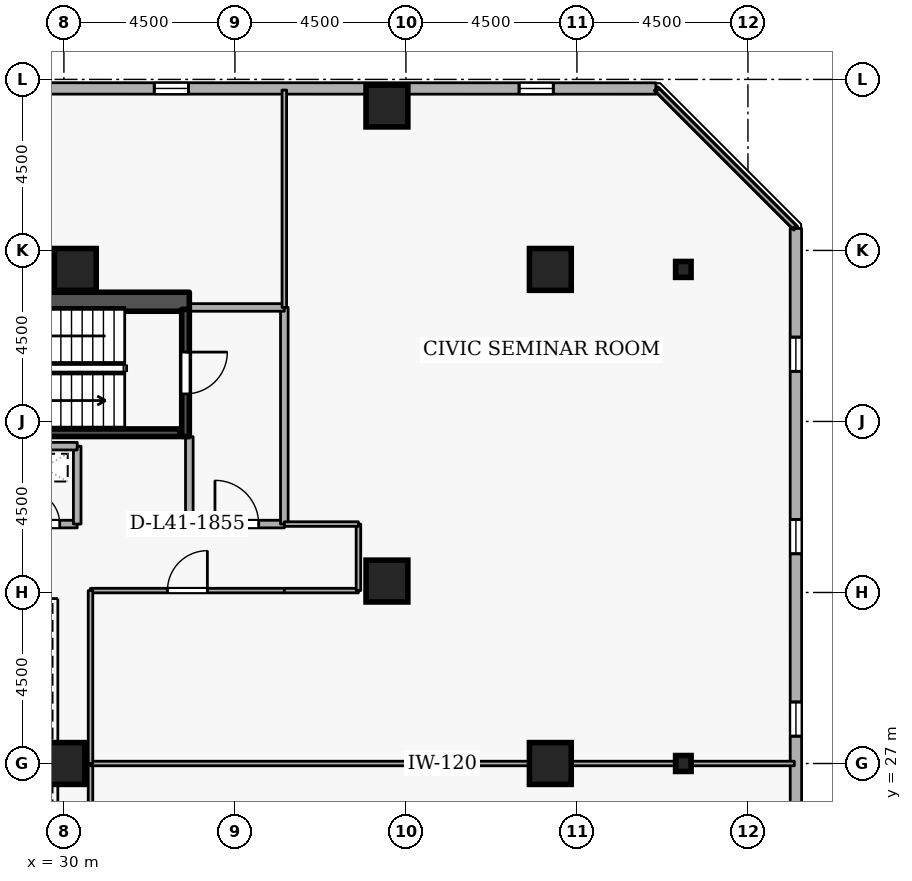
"""IFC4 building model, lengths in metres.
Left out: names, types, materials, properties, quantities, classifications, styles, units other than length and angle.
Written with IfcOpenShell. Run it as: python <this file> out.ifc"""

import sys

from ifc_helpers import new_model, si_unit, direction, frame, frame_2d, origin, origin_2d, place, context, subcontext, project, spatial, rectangle, i_section, extrude, element, fill, save


model = new_model("IFC4")
c1 = context("Model", 3, precision=1e-05, world=origin(), true_north=direction((0.0, 1.0)))
c2 = subcontext(c1, "Body", "Model", "MODEL_VIEW")
j1 = project(units=[si_unit("LENGTHUNIT", "METRE"), si_unit("PLANEANGLEUNIT", "RADIAN")], contexts=[c1])
p1 = place(None, origin())
s1 = spatial("IfcSite", under=j1, at=p1, CompositionType="ELEMENT")
p2 = place(p1, origin())
s2 = spatial("IfcBuilding", under=s1, at=p2, CompositionType="ELEMENT")
p3 = place(p2, frame((0.0, 0.0, 156.3)))
s3 = spatial("IfcBuildingStorey", under=s2, at=p3, CompositionType="ELEMENT", Elevation=156.3)
p4 = place(p3, frame((17.7, 39.15, 0.0), z_axis=(0.0, 0.0, 1.0), x_axis=(1.0, 0.0, 0.0)))
e1 = element("IfcWall", 1, at=p4, inside=s3, PredefinedType="SHEAR", context=c2, shape_type="SweptSolid", body=[
    extrude(rectangle(XDim=15.6, YDim=0.5, at=frame_2d((7.8, 0.0))), origin(), (0.0, 0.0, 1.0), 3.6),
])
for number, where, z_axis, x_axis in (
    (2, (42.8, 27.0, 0.0), (0.0, 0.0, 1.0), (1.0, 0.0, 0.0)),
    (3, (42.8, 40.0, 0.0), (0.0, 0.0, 1.0), (1.0, 0.0, 0.0)),
    (4, (38.5, 44.3, 0.0), (0.0, 0.0, 1.0), (1.0, 0.0, 0.0)),
    (5, (38.5, 31.8, 0.0), (0.0, 0.0, 1.0), (1.0, 0.0, 0.0)),
    (6, (30.3, 40.0, 0.0), (0.0, 0.0, 1.0), (1.0, 0.0, 0.0)),
    (7, (30.0, 27.0, 0.0), (0.0, 0.0, 1.0), (1.0, 0.0, 0.0)),
):
    element("IfcColumn", number, at=place(p3, frame(where, z_axis=z_axis, x_axis=x_axis)), inside=s3, PredefinedType="COLUMN", context=c2, shape_type="SweptSolid", body=[
        extrude(rectangle(XDim=1.1, YDim=1.1, at=origin_2d()), origin(), (0.0, 0.0, 1.0), 3.6),
    ])
for number, where, z_axis, x_axis in (
    (8, (46.3, 27.0, 0.0), (0.0, 0.0, 1.0), (1.0, 0.0, 0.0)),
    (9, (46.3, 40.0, 0.0), (0.0, 0.0, 1.0), (1.0, 0.0, 0.0)),
):
    element("IfcColumn", number, at=place(p3, frame(where, z_axis=z_axis, x_axis=x_axis)), inside=s3, PredefinedType="COLUMN", context=c2, shape_type="SweptSolid", body=[
        extrude(i_section(OverallWidth=0.407, OverallDepth=0.419, WebThickness=0.031, FlangeThickness=0.049, FilletRadius=0.015, at=origin_2d()), origin(), (0.0, 0.0, 1.0), 3.6),
    ])
p5 = place(p3, frame((49.265, 5.819, 0.0), z_axis=(0.0, 0.0, 1.0), x_axis=(-0.000103863011, 0.999999994606, 0.0)))
e10 = element("IfcWall", 10, at=p5, inside=s3, PredefinedType="STANDARD", context=c2, shape_type="SweptSolid", body=[
    extrude(rectangle(XDim=35.259, YDim=0.3, at=frame_2d((17.629, 0.0))), origin(), (0.0, 0.0, 1.0), 2.7),
])
p6 = place(p5, frame((2.7, 0.0, 0.72)))
e11 = element("IfcOpeningElement", 11, at=p6, cuts=e10, PredefinedType="OPENING", context=c2, shape_type="SweptSolid", body=[
    extrude(rectangle(XDim=0.9, YDim=1.75, at=frame_2d((0.45, 0.875))), frame((0.0, 0.16, 0.0), z_axis=(0.0, -1.0, 0.0), x_axis=(1.0, 0.0, 0.0)), (0.0, 0.0, 1.0), 0.32),
])
p7 = place(p5, frame((7.5, 0.0, 0.72)))
e12 = element("IfcOpeningElement", 12, at=p7, cuts=e10, PredefinedType="OPENING", context=c2, shape_type="SweptSolid", body=[
    extrude(rectangle(XDim=0.9, YDim=1.75, at=frame_2d((0.45, 0.875))), frame((0.0, 0.16, 0.0), z_axis=(0.0, -1.0, 0.0), x_axis=(1.0, 0.0, 0.0)), (0.0, 0.0, 1.0), 0.32),
])
p8 = place(p5, frame((12.3, 0.0, 0.72)))
e13 = element("IfcOpeningElement", 13, at=p8, cuts=e10, PredefinedType="OPENING", context=c2, shape_type="SweptSolid", body=[
    extrude(rectangle(XDim=0.9, YDim=1.75, at=frame_2d((0.45, 0.875))), frame((0.0, 0.16, 0.0), z_axis=(0.0, -1.0, 0.0), x_axis=(1.0, 0.0, 0.0)), (0.0, 0.0, 1.0), 0.32),
])
p9 = place(p5, frame((17.1, 0.0, 0.72)))
e14 = element("IfcOpeningElement", 14, at=p9, cuts=e10, PredefinedType="OPENING", context=c2, shape_type="SweptSolid", body=[
    extrude(rectangle(XDim=0.9, YDim=1.75, at=frame_2d((0.45, 0.875))), frame((0.0, 0.16, 0.0), z_axis=(0.0, -1.0, 0.0), x_axis=(1.0, 0.0, 0.0)), (0.0, 0.0, 1.0), 0.32),
])
p10 = place(p5, frame((21.9, 0.0, 0.72)))
e15 = element("IfcOpeningElement", 15, at=p10, cuts=e10, PredefinedType="OPENING", context=c2, shape_type="SweptSolid", body=[
    extrude(rectangle(XDim=0.9, YDim=1.75, at=frame_2d((0.45, 0.875))), frame((0.0, 0.16, 0.0), z_axis=(0.0, -1.0, 0.0), x_axis=(1.0, 0.0, 0.0)), (0.0, 0.0, 1.0), 0.32),
])
p11 = place(p5, frame((26.7, 0.0, 0.72)))
e16 = element("IfcOpeningElement", 16, at=p11, cuts=e10, PredefinedType="OPENING", context=c2, shape_type="SweptSolid", body=[
    extrude(rectangle(XDim=0.9, YDim=1.75, at=frame_2d((0.45, 0.875))), frame((0.0, 0.16, 0.0), z_axis=(0.0, -1.0, 0.0), x_axis=(1.0, 0.0, 0.0)), (0.0, 0.0, 1.0), 0.32),
])
p12 = place(p5, frame((31.5, 0.0, 0.72)))
e17 = element("IfcOpeningElement", 17, at=p12, cuts=e10, PredefinedType="OPENING", context=c2, shape_type="SweptSolid", body=[
    extrude(rectangle(XDim=0.9, YDim=1.75, at=frame_2d((0.45, 0.875))), frame((0.0, 0.16, 0.0), z_axis=(0.0, -1.0, 0.0), x_axis=(1.0, 0.0, 0.0)), (0.0, 0.0, 1.0), 0.32),
])
p13 = place(p3, frame((45.578, 44.761, 0.0), z_axis=(0.0, 0.0, 1.0), x_axis=(-0.999999994606, 0.000103863011, 0.0)))
e18 = element("IfcWall", 18, at=p13, inside=s3, PredefinedType="STANDARD", context=c2, shape_type="SweptSolid", body=[
    extrude(rectangle(XDim=35.259, YDim=0.3, at=frame_2d((17.629, 0.0))), origin(), (0.0, 0.0, 1.0), 2.7),
])
p14 = place(p13, frame((2.7, 0.0, 0.72)))
e19 = element("IfcOpeningElement", 19, at=p14, cuts=e18, PredefinedType="OPENING", context=c2, shape_type="SweptSolid", body=[
    extrude(rectangle(XDim=0.9, YDim=1.75, at=frame_2d((0.45, 0.875))), frame((0.0, 0.16, 0.0), z_axis=(0.0, -1.0, 0.0), x_axis=(1.0, 0.0, 0.0)), (0.0, 0.0, 1.0), 0.32),
])
p15 = place(p13, frame((12.3, 0.0, 0.72)))
e20 = element("IfcOpeningElement", 20, at=p15, cuts=e18, PredefinedType="OPENING", context=c2, shape_type="SweptSolid", body=[
    extrude(rectangle(XDim=0.9, YDim=1.75, at=frame_2d((0.45, 0.875))), frame((0.0, 0.16, 0.0), z_axis=(0.0, -1.0, 0.0), x_axis=(1.0, 0.0, 0.0)), (0.0, 0.0, 1.0), 0.32),
])
p16 = place(p13, frame((17.1, 0.0, 0.72)))
e21 = element("IfcOpeningElement", 21, at=p16, cuts=e18, PredefinedType="OPENING", context=c2, shape_type="SweptSolid", body=[
    extrude(rectangle(XDim=0.9, YDim=1.75, at=frame_2d((0.45, 0.875))), frame((0.0, 0.16, 0.0), z_axis=(0.0, -1.0, 0.0), x_axis=(1.0, 0.0, 0.0)), (0.0, 0.0, 1.0), 0.32),
])
p17 = place(p13, frame((21.9, 0.0, 0.72)))
e22 = element("IfcOpeningElement", 22, at=p17, cuts=e18, PredefinedType="OPENING", context=c2, shape_type="SweptSolid", body=[
    extrude(rectangle(XDim=0.9, YDim=1.75, at=frame_2d((0.45, 0.875))), frame((0.0, 0.16, 0.0), z_axis=(0.0, -1.0, 0.0), x_axis=(1.0, 0.0, 0.0)), (0.0, 0.0, 1.0), 0.32),
])
p18 = place(p13, frame((26.7, 0.0, 0.72)))
e23 = element("IfcOpeningElement", 23, at=p18, cuts=e18, PredefinedType="OPENING", context=c2, shape_type="SweptSolid", body=[
    extrude(rectangle(XDim=0.9, YDim=1.75, at=frame_2d((0.45, 0.875))), frame((0.0, 0.16, 0.0), z_axis=(0.0, -1.0, 0.0), x_axis=(1.0, 0.0, 0.0)), (0.0, 0.0, 1.0), 0.32),
])
p19 = place(p3, frame((33.2, 38.95, 0.0), z_axis=(0.0, 0.0, 1.0), x_axis=(0.0, -1.0, 0.0)))
e24 = element("IfcWall", 24, at=p19, inside=s3, PredefinedType="SHEAR", context=c2, shape_type="SweptSolid", body=[
    extrude(rectangle(XDim=3.35, YDim=0.2, at=frame_2d((1.675, 0.0))), origin(), (0.0, 0.0, 1.0), 3.6),
])
p20 = place(p19, frame((1.125, 0.0, 0.0)))
e25 = element("IfcOpeningElement", 25, at=p20, cuts=e24, PredefinedType="OPENING", context=c2, shape_type="SweptSolid", body=[
    extrude(rectangle(XDim=1.1, YDim=2.1, at=frame_2d((0.55, 1.05))), frame((0.0, 0.11, 0.0), z_axis=(0.0, -1.0, 0.0), x_axis=(1.0, 0.0, 0.0)), (0.0, 0.0, 1.0), 0.22),
])
p21 = place(p3, frame((25.95, 35.703, 0.0), z_axis=(0.0, 0.0, 1.0), x_axis=(1.0, 0.0, 0.0)))
e26 = element("IfcWall", 26, at=p21, inside=s3, PredefinedType="SHEAR", context=c2, shape_type="SweptSolid", body=[
    extrude(rectangle(XDim=7.1, YDim=0.2, at=frame_2d((3.55, 0.0))), origin(), (0.0, 0.0, 1.0), 3.6),
])
p22 = place(p3, frame((33.3, 33.3, 0.0), z_axis=(0.0, 0.0, 1.0), x_axis=(1.0, 0.0, 0.0)))
e27 = element("IfcWall", 27, at=p22, inside=s3, PredefinedType="STANDARD", context=c2, shape_type="SweptSolid", body=[
    extrude(rectangle(XDim=2.5, YDim=0.2, at=frame_2d((1.25, 0.0))), origin(), (0.0, 0.0, 1.0), 3.34),
])
p23 = place(p22, frame((0.675, 0.0, 0.0)))
e28 = element("IfcOpeningElement", 28, at=p23, cuts=e27, PredefinedType="OPENING", context=c2, shape_type="SweptSolid", body=[
    extrude(rectangle(XDim=1.15, YDim=2.1, at=frame_2d((0.575, 1.05))), frame((0.0, 0.11, 0.0), z_axis=(0.0, -1.0, 0.0), x_axis=(1.0, 0.0, 0.0)), (0.0, 0.0, 1.0), 0.22),
])
p24 = place(p3, frame((35.8, 33.3, 0.0), z_axis=(0.0, 0.0, 1.0), x_axis=(0.0, 1.0, 0.0)))
e29 = element("IfcWall", 29, at=p24, inside=s3, PredefinedType="STANDARD", context=c2, shape_type="SweptSolid", body=[
    extrude(rectangle(XDim=5.7, YDim=0.2, at=frame_2d((2.85, 0.0))), origin(), (0.0, 0.0, 1.0), 3.34),
])
p25 = place(p3, frame((35.8, 39.0, 0.0), z_axis=(0.0, 0.0, 1.0), x_axis=(-1.0, 0.0, 0.0)))
e30 = element("IfcWall", 30, at=p25, inside=s3, PredefinedType="STANDARD", context=c2, shape_type="SweptSolid", body=[
    extrude(rectangle(XDim=2.5, YDim=0.2, at=frame_2d((1.25, 0.0))), origin(), (0.0, 0.0, 1.0), 3.34),
])
p26 = place(p3, frame((33.3, 35.6, 0.0), z_axis=(0.0, 0.0, 1.0), x_axis=(0.0, -1.0, 0.0)))
e31 = element("IfcWall", 31, at=p26, inside=s3, PredefinedType="STANDARD", context=c2, shape_type="SweptSolid", body=[
    extrude(rectangle(XDim=2.3, YDim=0.2, at=frame_2d((1.15, 0.0))), origin(), (0.0, 0.0, 1.0), 2.545),
])
p27 = place(p3, frame((28.55, 33.3, 0.0), z_axis=(0.0, 0.0, 1.0), x_axis=(1.0, 0.0, 0.0)))
e32 = element("IfcWall", 32, at=p27, inside=s3, PredefinedType="STANDARD", context=c2, shape_type="SweptSolid", body=[
    extrude(rectangle(XDim=1.8, YDim=0.2, at=frame_2d((0.9, 0.0))), origin(), (0.0, 0.0, 1.0), 3.34),
])
p28 = place(p27, frame((0.46, 0.0, 0.0)))
e33 = element("IfcOpeningElement", 33, at=p28, cuts=e32, PredefinedType="OPENING", context=c2, shape_type="SweptSolid", body=[
    extrude(rectangle(XDim=0.88, YDim=2.04, at=frame_2d((0.44, 1.02))), frame((0.0, 0.11, 0.0), z_axis=(0.0, -1.0, 0.0), x_axis=(1.0, 0.0, 0.0)), (0.0, 0.0, 1.0), 0.22),
])
p29 = place(p3, frame((30.35, 33.3, 0.0), z_axis=(0.0, 0.0, 1.0), x_axis=(0.0, 1.0, 0.0)))
e34 = element("IfcWall", 34, at=p29, inside=s3, PredefinedType="STANDARD", context=c2, shape_type="SweptSolid", body=[
    extrude(rectangle(XDim=2.05, YDim=0.2, at=frame_2d((1.025, 0.0))), origin(), (0.0, 0.0, 1.0), 3.34),
])
p30 = place(p3, frame((30.35, 35.35, 0.0), z_axis=(0.0, 0.0, 1.0), x_axis=(-1.0, 0.0, 0.0)))
e35 = element("IfcWall", 35, at=p30, inside=s3, PredefinedType="STANDARD", context=c2, shape_type="SweptSolid", body=[
    extrude(rectangle(XDim=1.8, YDim=0.2, at=frame_2d((0.9, 0.0))), origin(), (0.0, 0.0, 1.0), 3.34),
])
p31 = place(p3, frame((30.7, 22.45, 0.0), z_axis=(0.0, 0.0, 1.0), x_axis=(0.0, 1.0, 0.0)))
e36 = element("IfcWall", 36, at=p31, inside=s3, PredefinedType="PARTITIONING", context=c2, shape_type="SweptSolid", body=[
    extrude(rectangle(XDim=4.55, YDim=0.12, at=frame_2d((2.275, 0.0))), origin(), (0.0, 0.0, 1.0), 3.34),
])
p32 = place(p3, frame((30.7, 27.0, 0.0), z_axis=(0.0, 0.0, 1.0), x_axis=(1.0, 0.0, 0.0)))
e37 = element("IfcWall", 37, at=p32, inside=s3, PredefinedType="PARTITIONING", context=c2, shape_type="SweptSolid", body=[
    extrude(rectangle(XDim=18.52, YDim=0.12, at=frame_2d((9.26, 0.0))), origin(), (0.0, 0.0, 1.0), 2.932),
])
p33 = place(p3, frame((30.7, 31.55, 0.0), z_axis=(0.0, 0.0, 1.0), x_axis=(1.0, 0.0, 0.0)))
e38 = element("IfcWall", 38, at=p33, inside=s3, PredefinedType="PARTITIONING", context=c2, shape_type="SweptSolid", body=[
    extrude(rectangle(XDim=5.1, YDim=0.12, at=frame_2d((2.55, 0.0))), origin(), (0.0, 0.0, 1.0), 3.34),
])
p34 = place(p33, frame((2.025, 0.0, 0.0)))
e39 = element("IfcOpeningElement", 39, at=p34, cuts=e38, PredefinedType="OPENING", context=c2, shape_type="SweptSolid", body=[
    extrude(rectangle(XDim=1.05, YDim=2.1, at=frame_2d((0.525, 1.05))), frame((0.0, 0.07, 0.0), z_axis=(0.0, -1.0, 0.0), x_axis=(1.0, 0.0, 0.0)), (0.0, 0.0, 1.0), 0.14),
])
p35 = place(p3, frame((35.8, 31.55, 0.0), z_axis=(0.0, 0.0, 1.0), x_axis=(1.0, 0.0, 0.0)))
e40 = element("IfcWall", 40, at=p35, inside=s3, PredefinedType="PARTITIONING", context=c2, shape_type="SweptSolid", body=[
    extrude(rectangle(XDim=1.95, YDim=0.12, at=frame_2d((0.975, 0.0))), origin(), (0.0, 0.0, 1.0), 3.34),
])
p36 = place(p3, frame((37.75, 31.55, 0.0), z_axis=(0.0, 0.0, 1.0), x_axis=(0.0, 1.0, 0.0)))
e41 = element("IfcWall", 41, at=p36, inside=s3, PredefinedType="PARTITIONING", context=c2, shape_type="SweptSolid", body=[
    extrude(rectangle(XDim=1.75, YDim=0.12, at=frame_2d((0.875, 0.0))), origin(), (0.0, 0.0, 1.0), 3.34),
])
p37 = place(p3, frame((37.75, 33.3, 0.0), z_axis=(0.0, 0.0, 1.0), x_axis=(-1.0, 0.0, 0.0)))
e42 = element("IfcWall", 42, at=p37, inside=s3, PredefinedType="PARTITIONING", context=c2, shape_type="SweptSolid", body=[
    extrude(rectangle(XDim=1.95, YDim=0.12, at=frame_2d((0.975, 0.0))), origin(), (0.0, 0.0, 1.0), 3.34),
])
p38 = place(p3, frame((35.8, 39.0, 0.0), z_axis=(0.0, 0.0, 1.0), x_axis=(0.0, 1.0, 0.0)))
e43 = element("IfcWall", 43, at=p38, inside=s3, PredefinedType="PARTITIONING", context=c2, shape_type="SweptSolid", body=[
    extrude(rectangle(XDim=5.72, YDim=0.12, at=frame_2d((2.86, 0.0))), origin(), (0.0, 0.0, 1.0), 3.34),
])
p39 = place(p3, frame((45.617, 44.72, 0.0), z_axis=(0.0, 0.0, 1.0), x_axis=(0.707106781187, -0.707106781187, 0.0)))
e44 = element("IfcWall", 44, at=p39, inside=s3, PredefinedType="PARTITIONING", context=c2, shape_type="SweptSolid", body=[
    extrude(rectangle(XDim=5.095, YDim=0.12, at=frame_2d((2.547, 0.0))), origin(), (0.0, 0.0, 1.0), 3.34),
])
p40 = place(p3, frame((30.7, 27.0, 0.0), z_axis=(0.0, 0.0, 1.0), x_axis=(0.0, 1.0, 0.0)))
e45 = element("IfcWall", 45, at=p40, inside=s3, PredefinedType="PARTITIONING", context=c2, shape_type="SweptSolid", body=[
    extrude(rectangle(XDim=4.55, YDim=0.12, at=frame_2d((2.275, 0.0))), origin(), (0.0, 0.0, 1.0), 3.34),
])
p41 = place(p10, origin())
e46 = element("IfcWindow", 46, at=p41, inside=s3, PartitioningType="SINGLE_PANEL", PredefinedType="WINDOW", context=c2, shape_type="SweptSolid", body=[
    extrude(rectangle(XDim=0.9, YDim=1.75, at=frame_2d((0.45, 0.875))), frame((0.0, 0.03, 0.0), z_axis=(0.0, -1.0, 0.0), x_axis=(1.0, 0.0, 0.0)), (0.0, 0.0, 1.0), 0.06),
])
fill(e15, e46)
p42 = place(p11, origin())
e47 = element("IfcWindow", 47, at=p42, inside=s3, PartitioningType="SINGLE_PANEL", PredefinedType="WINDOW", context=c2, shape_type="SweptSolid", body=[
    extrude(rectangle(XDim=0.9, YDim=1.75, at=frame_2d((0.45, 0.875))), frame((0.0, 0.03, 0.0), z_axis=(0.0, -1.0, 0.0), x_axis=(1.0, 0.0, 0.0)), (0.0, 0.0, 1.0), 0.06),
])
fill(e16, e47)
p43 = place(p12, origin())
e48 = element("IfcWindow", 48, at=p43, inside=s3, PartitioningType="SINGLE_PANEL", PredefinedType="WINDOW", context=c2, shape_type="SweptSolid", body=[
    extrude(rectangle(XDim=0.9, YDim=1.75, at=frame_2d((0.45, 0.875))), frame((0.0, 0.03, 0.0), z_axis=(0.0, -1.0, 0.0), x_axis=(1.0, 0.0, 0.0)), (0.0, 0.0, 1.0), 0.06),
])
fill(e17, e48)
p44 = place(p14, origin())
e49 = element("IfcWindow", 49, at=p44, inside=s3, PartitioningType="SINGLE_PANEL", PredefinedType="WINDOW", context=c2, shape_type="SweptSolid", body=[
    extrude(rectangle(XDim=0.9, YDim=1.75, at=frame_2d((0.45, 0.875))), frame((0.0, 0.03, 0.0), z_axis=(0.0, -1.0, 0.0), x_axis=(1.0, 0.0, 0.0)), (0.0, 0.0, 1.0), 0.06),
])
fill(e19, e49)
p45 = place(p15, origin())
e50 = element("IfcWindow", 50, at=p45, inside=s3, PartitioningType="SINGLE_PANEL", PredefinedType="WINDOW", context=c2, shape_type="SweptSolid", body=[
    extrude(rectangle(XDim=0.9, YDim=1.75, at=frame_2d((0.45, 0.875))), frame((0.0, 0.03, 0.0), z_axis=(0.0, -1.0, 0.0), x_axis=(1.0, 0.0, 0.0)), (0.0, 0.0, 1.0), 0.06),
])
fill(e20, e50)
p46 = place(p20, origin())
e51 = element("IfcDoor", 51, at=p46, inside=s3, OperationType="SINGLE_SWING_LEFT", PredefinedType="DOOR", context=c2, shape_type="SweptSolid", body=[
    extrude(rectangle(XDim=1.1, YDim=2.1, at=frame_2d((0.55, 1.05))), frame((0.0, 0.025, 0.0), z_axis=(0.0, -1.0, 0.0), x_axis=(1.0, 0.0, 0.0)), (0.0, 0.0, 1.0), 0.05),
])
fill(e25, e51)
p47 = place(p23, origin())
e52 = element("IfcDoor", 52, at=p47, inside=s3, OperationType="SINGLE_SWING_LEFT", PredefinedType="DOOR", context=c2, shape_type="SweptSolid", body=[
    extrude(rectangle(XDim=1.15, YDim=2.1, at=frame_2d((0.575, 1.05))), frame((0.0, 0.025, 0.0), z_axis=(0.0, -1.0, 0.0), x_axis=(1.0, 0.0, 0.0)), (0.0, 0.0, 1.0), 0.05),
])
fill(e28, e52)
p48 = place(p28, origin())
e53 = element("IfcDoor", 53, at=p48, inside=s3, OperationType="SINGLE_SWING_LEFT", PredefinedType="DOOR", context=c2, shape_type="SweptSolid", body=[
    extrude(rectangle(XDim=0.88, YDim=2.04, at=frame_2d((0.44, 1.02))), frame((0.0, 0.025, 0.0), z_axis=(0.0, -1.0, 0.0), x_axis=(1.0, 0.0, 0.0)), (0.0, 0.0, 1.0), 0.05),
])
fill(e33, e53)
p49 = place(p34, origin())
e54 = element("IfcDoor", 54, at=p49, inside=s3, OperationType="SINGLE_SWING_RIGHT", PredefinedType="DOOR", context=c2, shape_type="SweptSolid", body=[
    extrude(rectangle(XDim=1.05, YDim=2.1, at=frame_2d((0.525, 1.05))), frame((0.0, 0.025, 0.0), z_axis=(0.0, -1.0, 0.0), x_axis=(1.0, 0.0, 0.0)), (0.0, 0.0, 1.0), 0.05),
])
fill(e39, e54)
save(model, sys.argv[1])
